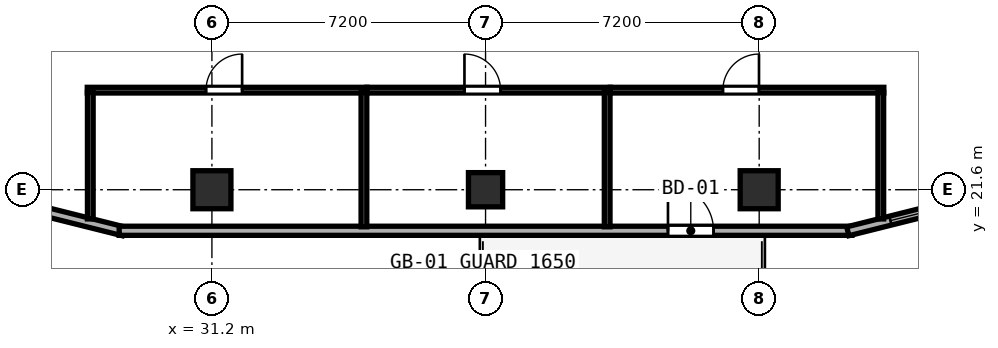
"""IFC4 building model, lengths in metres.
Left out: names, types, materials, properties, quantities, classifications, styles, units other than length and angle.
Written with IfcOpenShell. Run it as: python <this file> out.ifc"""

import sys

from ifc_helpers import new_model, si_unit, direction, frame, frame_2d, origin, origin_2d, place, context, subcontext, project, spatial, rectangle, hollow_rectangle, extrude, element, fill, save


model = new_model("IFC4")
c1 = context("Model", 3, precision=1e-05, world=origin(), true_north=direction((0.0, 1.0)))
c2 = subcontext(c1, "Body", "Model", "MODEL_VIEW")
j1 = project(units=[si_unit("LENGTHUNIT", "METRE"), si_unit("PLANEANGLEUNIT", "RADIAN")], contexts=[c1])
p1 = place(None, origin())
s1 = spatial("IfcSite", under=j1, at=p1, CompositionType="ELEMENT")
p2 = place(p1, origin())
s2 = spatial("IfcBuilding", under=s1, at=p2, CompositionType="ELEMENT")
p3 = place(p2, frame((0.0, 0.0, 152.4)))
s3 = spatial("IfcBuildingStorey", under=s2, at=p3, CompositionType="ELEMENT", Elevation=152.4)
for number, where, z_axis, x_axis in (
    (1, (31.2, 21.6, 0.0), (0.0, 0.0, 1.0), (1.0, 0.0, 0.0)),
    (2, (45.6, 21.6, 0.0), (0.0, 0.0, 1.0), (1.0, 0.0, 0.0)),
):
    element("IfcColumn", number, at=place(p3, frame(where, z_axis=z_axis, x_axis=x_axis)), inside=s3, PredefinedType="COLUMN", context=c2, shape_type="SweptSolid", body=[
        extrude(hollow_rectangle(XDim=1.0, YDim=1.0, WallThickness=0.038, at=origin_2d()), origin(), (0.0, 0.0, 1.0), 3.8),
    ])
p4 = place(p3, frame((38.4, 21.6, 0.0), z_axis=(0.0, 0.0, 1.0), x_axis=(1.0, 0.0, 0.0)))
e3 = element("IfcColumn", 3, at=p4, inside=s3, PredefinedType="COLUMN", context=c2, shape_type="SweptSolid", body=[
    extrude(hollow_rectangle(XDim=0.9, YDim=0.9, WallThickness=0.034, at=origin_2d()), origin(), (0.0, 0.0, 1.0), 3.8),
])
p5 = place(p3, frame((24.492, 21.601, 0.0), z_axis=(0.0, 0.0, 1.0), x_axis=(0.970145683738, -0.242522890311, 0.0)))
e4 = element("IfcWall", 4, at=p5, inside=s3, PredefinedType="SOLIDWALL", context=c2, shape_type="SweptSolid", body=[
    extrude(rectangle(XDim=4.511, YDim=0.24, at=frame_2d((2.255, 0.0))), origin(), (0.0, 0.0, 1.0), 3.145),
])
p6 = place(p5, frame((0.7, 0.0, 0.85)))
e5 = element("IfcOpeningElement", 5, at=p6, cuts=e4, PredefinedType="OPENING", context=c2, shape_type="SweptSolid", body=[
    extrude(rectangle(XDim=1.15, YDim=1.8, at=frame_2d((0.575, 0.9))), frame((0.0, 0.13, 0.0), z_axis=(0.0, -1.0, 0.0), x_axis=(1.0, 0.0, 0.0)), (0.0, 0.0, 1.0), 0.26),
])
p7 = place(p3, frame((28.76, 20.52, 0.0), z_axis=(0.0, 0.0, 1.0), x_axis=(1.0, 0.0, 0.0)))
e6 = element("IfcWall", 6, at=p7, inside=s3, PredefinedType="SOLIDWALL", context=c2, shape_type="SweptSolid", body=[
    extrude(rectangle(XDim=19.281, YDim=0.24, at=frame_2d((9.64, 0.0))), origin(), (0.0, 0.0, 1.0), 3.6),
])
p8 = place(p7, frame((15.64, 0.0, 0.0), z_axis=(0.0, 0.0, 1.0), x_axis=(-1.0, 0.0, 0.0)))
e7 = element("IfcOpeningElement", 7, at=p8, cuts=e6, PredefinedType="OPENING", context=c2, shape_type="SweptSolid", body=[
    extrude(rectangle(XDim=1.2, YDim=2.15, at=frame_2d((0.6, 1.075))), frame((0.0, 0.13, 0.0), z_axis=(0.0, -1.0, 0.0), x_axis=(1.0, 0.0, 0.0)), (0.0, 0.0, 1.0), 0.26),
])
p9 = place(p3, frame((47.932, 20.507, 0.0), z_axis=(0.0, 0.0, 1.0), x_axis=(0.970145683738, 0.242522890311, 0.0)))
e8 = element("IfcWall", 8, at=p9, inside=s3, PredefinedType="SOLIDWALL", context=c2, shape_type="SweptSolid", body=[
    extrude(rectangle(XDim=4.511, YDim=0.24, at=frame_2d((2.255, 0.0))), origin(), (0.0, 0.0, 1.0), 3.145),
])
p10 = place(p9, frame((1.156, 0.0, 0.85)))
e9 = element("IfcOpeningElement", 9, at=p10, cuts=e8, PredefinedType="OPENING", context=c2, shape_type="SweptSolid", body=[
    extrude(rectangle(XDim=1.15, YDim=1.8, at=frame_2d((0.575, 0.9))), frame((0.0, 0.13, 0.0), z_axis=(0.0, -1.0, 0.0), x_axis=(1.0, 0.0, 0.0)), (0.0, 0.0, 1.0), 0.26),
])
p11 = place(p3, frame((27.92, 24.22, 0.0), z_axis=(0.0, 0.0, 1.0), x_axis=(1.0, 0.0, 0.0)))
e10 = element("IfcWall", 10, at=p11, inside=s3, PredefinedType="PARTITIONING", context=c2, shape_type="SweptSolid", body=[
    extrude(rectangle(XDim=7.36, YDim=0.15, at=frame_2d((3.68, 0.0))), origin(), (0.0, 0.0, 1.0), 3.6),
])
p12 = place(p11, frame((4.075, 0.0, 0.0), z_axis=(0.0, 0.0, 1.0), x_axis=(-1.0, 0.0, 0.0)))
e11 = element("IfcOpeningElement", 11, at=p12, cuts=e10, PredefinedType="OPENING", context=c2, shape_type="SweptSolid", body=[
    extrude(rectangle(XDim=0.95, YDim=2.12, at=frame_2d((0.475, 1.06))), frame((0.0, 0.085, 0.0), z_axis=(0.0, -1.0, 0.0), x_axis=(1.0, 0.0, 0.0)), (0.0, 0.0, 1.0), 0.17),
])
p13 = place(p3, frame((28.0, 20.832, 0.0), z_axis=(0.0, 0.0, 1.0), x_axis=(0.0, 1.0, 0.0)))
e12 = element("IfcWall", 12, at=p13, inside=s3, PredefinedType="PARTITIONING", context=c2, shape_type="SweptSolid", body=[
    extrude(rectangle(XDim=3.328, YDim=0.15, at=frame_2d((1.664, 0.0))), origin(), (0.0, 0.0, 1.0), 3.6),
])
p14 = place(p3, frame((35.2, 20.625, 0.0), z_axis=(0.0, 0.0, 1.0), x_axis=(0.0, 1.0, 0.0)))
e13 = element("IfcWall", 13, at=p14, inside=s3, PredefinedType="PARTITIONING", context=c2, shape_type="SweptSolid", body=[
    extrude(rectangle(XDim=3.535, YDim=0.15, at=frame_2d((1.768, 0.0))), origin(), (0.0, 0.0, 1.0), 3.6),
])
p15 = place(p3, frame((35.282, 24.22, 0.0), z_axis=(0.0, 0.0, 1.0), x_axis=(1.0, 0.0, 0.0)))
e14 = element("IfcWall", 14, at=p15, inside=s3, PredefinedType="PARTITIONING", context=c2, shape_type="SweptSolid", body=[
    extrude(rectangle(XDim=6.398, YDim=0.15, at=frame_2d((3.199, 0.0))), origin(), (0.0, 0.0, 1.0), 3.6),
])
p16 = place(p15, frame((3.513, 0.0, 0.0), z_axis=(0.0, 0.0, 1.0), x_axis=(-1.0, 0.0, 0.0)))
e15 = element("IfcOpeningElement", 15, at=p16, cuts=e14, PredefinedType="OPENING", context=c2, shape_type="SweptSolid", body=[
    extrude(rectangle(XDim=0.95, YDim=2.12, at=frame_2d((0.475, 1.06))), frame((0.0, 0.085, 0.0), z_axis=(0.0, -1.0, 0.0), x_axis=(1.0, 0.0, 0.0)), (0.0, 0.0, 1.0), 0.17),
])
p17 = place(p3, frame((41.6, 20.625, 0.0), z_axis=(0.0, 0.0, 1.0), x_axis=(0.0, 1.0, 0.0)))
e16 = element("IfcWall", 16, at=p17, inside=s3, PredefinedType="PARTITIONING", context=c2, shape_type="SweptSolid", body=[
    extrude(rectangle(XDim=3.535, YDim=0.15, at=frame_2d((1.768, 0.0))), origin(), (0.0, 0.0, 1.0), 3.6),
])
p18 = place(p3, frame((41.682, 24.22, 0.0), z_axis=(0.0, 0.0, 1.0), x_axis=(1.0, 0.0, 0.0)))
e17 = element("IfcWall", 17, at=p18, inside=s3, PredefinedType="PARTITIONING", context=c2, shape_type="SweptSolid", body=[
    extrude(rectangle(XDim=7.198, YDim=0.15, at=frame_2d((3.599, 0.0))), origin(), (0.0, 0.0, 1.0), 3.6),
])
p19 = place(p18, frame((3.913, 0.0, 0.0), z_axis=(0.0, 0.0, 1.0), x_axis=(-1.0, 0.0, 0.0)))
e18 = element("IfcOpeningElement", 18, at=p19, cuts=e17, PredefinedType="OPENING", context=c2, shape_type="SweptSolid", body=[
    extrude(rectangle(XDim=0.95, YDim=2.12, at=frame_2d((0.475, 1.06))), frame((0.0, 0.085, 0.0), z_axis=(0.0, -1.0, 0.0), x_axis=(1.0, 0.0, 0.0)), (0.0, 0.0, 1.0), 0.17),
])
p20 = place(p3, frame((48.8, 20.832, 0.0), z_axis=(0.0, 0.0, 1.0), x_axis=(0.0, 1.0, 0.0)))
e19 = element("IfcWall", 19, at=p20, inside=s3, PredefinedType="PARTITIONING", context=c2, shape_type="SweptSolid", body=[
    extrude(rectangle(XDim=3.328, YDim=0.15, at=frame_2d((1.664, 0.0))), origin(), (0.0, 0.0, 1.0), 3.6),
])
p21 = place(p10, origin())
e20 = element("IfcWindow", 20, at=p21, inside=s3, PartitioningType="SINGLE_PANEL", PredefinedType="WINDOW", context=c2, shape_type="SweptSolid", body=[
    extrude(rectangle(XDim=1.15, YDim=1.8, at=frame_2d((0.575, 0.9))), frame((0.0, 0.03, 0.0), z_axis=(0.0, -1.0, 0.0), x_axis=(1.0, 0.0, 0.0)), (0.0, 0.0, 1.0), 0.06),
])
fill(e9, e20)
p22 = place(p8, origin())
e21 = element("IfcDoor", 21, at=p22, inside=s3, OperationType="SINGLE_SWING_RIGHT", PredefinedType="DOOR", context=c2, shape_type="SweptSolid", body=[
    extrude(rectangle(XDim=1.2, YDim=2.15, at=frame_2d((0.6, 1.075))), frame((0.0, 0.025, 0.0), z_axis=(0.0, -1.0, 0.0), x_axis=(1.0, 0.0, 0.0)), (0.0, 0.0, 1.0), 0.05),
])
fill(e7, e21)
p23 = place(p12, origin())
e22 = element("IfcDoor", 22, at=p23, inside=s3, OperationType="SINGLE_SWING_LEFT", PredefinedType="DOOR", context=c2, shape_type="SweptSolid", body=[
    extrude(rectangle(XDim=0.95, YDim=2.12, at=frame_2d((0.475, 1.06))), frame((0.0, 0.025, 0.0), z_axis=(0.0, -1.0, 0.0), x_axis=(1.0, 0.0, 0.0)), (0.0, 0.0, 1.0), 0.05),
])
fill(e11, e22)
p24 = place(p16, origin())
e23 = element("IfcDoor", 23, at=p24, inside=s3, OperationType="SINGLE_SWING_RIGHT", PredefinedType="DOOR", context=c2, shape_type="SweptSolid", body=[
    extrude(rectangle(XDim=0.95, YDim=2.12, at=frame_2d((0.475, 1.06))), frame((0.0, 0.025, 0.0), z_axis=(0.0, -1.0, 0.0), x_axis=(1.0, 0.0, 0.0)), (0.0, 0.0, 1.0), 0.05),
])
fill(e15, e23)
p25 = place(p19, origin())
e24 = element("IfcDoor", 24, at=p25, inside=s3, OperationType="SINGLE_SWING_LEFT", PredefinedType="DOOR", context=c2, shape_type="SweptSolid", body=[
    extrude(rectangle(XDim=0.95, YDim=2.12, at=frame_2d((0.475, 1.06))), frame((0.0, 0.025, 0.0), z_axis=(0.0, -1.0, 0.0), x_axis=(1.0, 0.0, 0.0)), (0.0, 0.0, 1.0), 0.05),
])
fill(e18, e24)
save(model, sys.argv[1])
